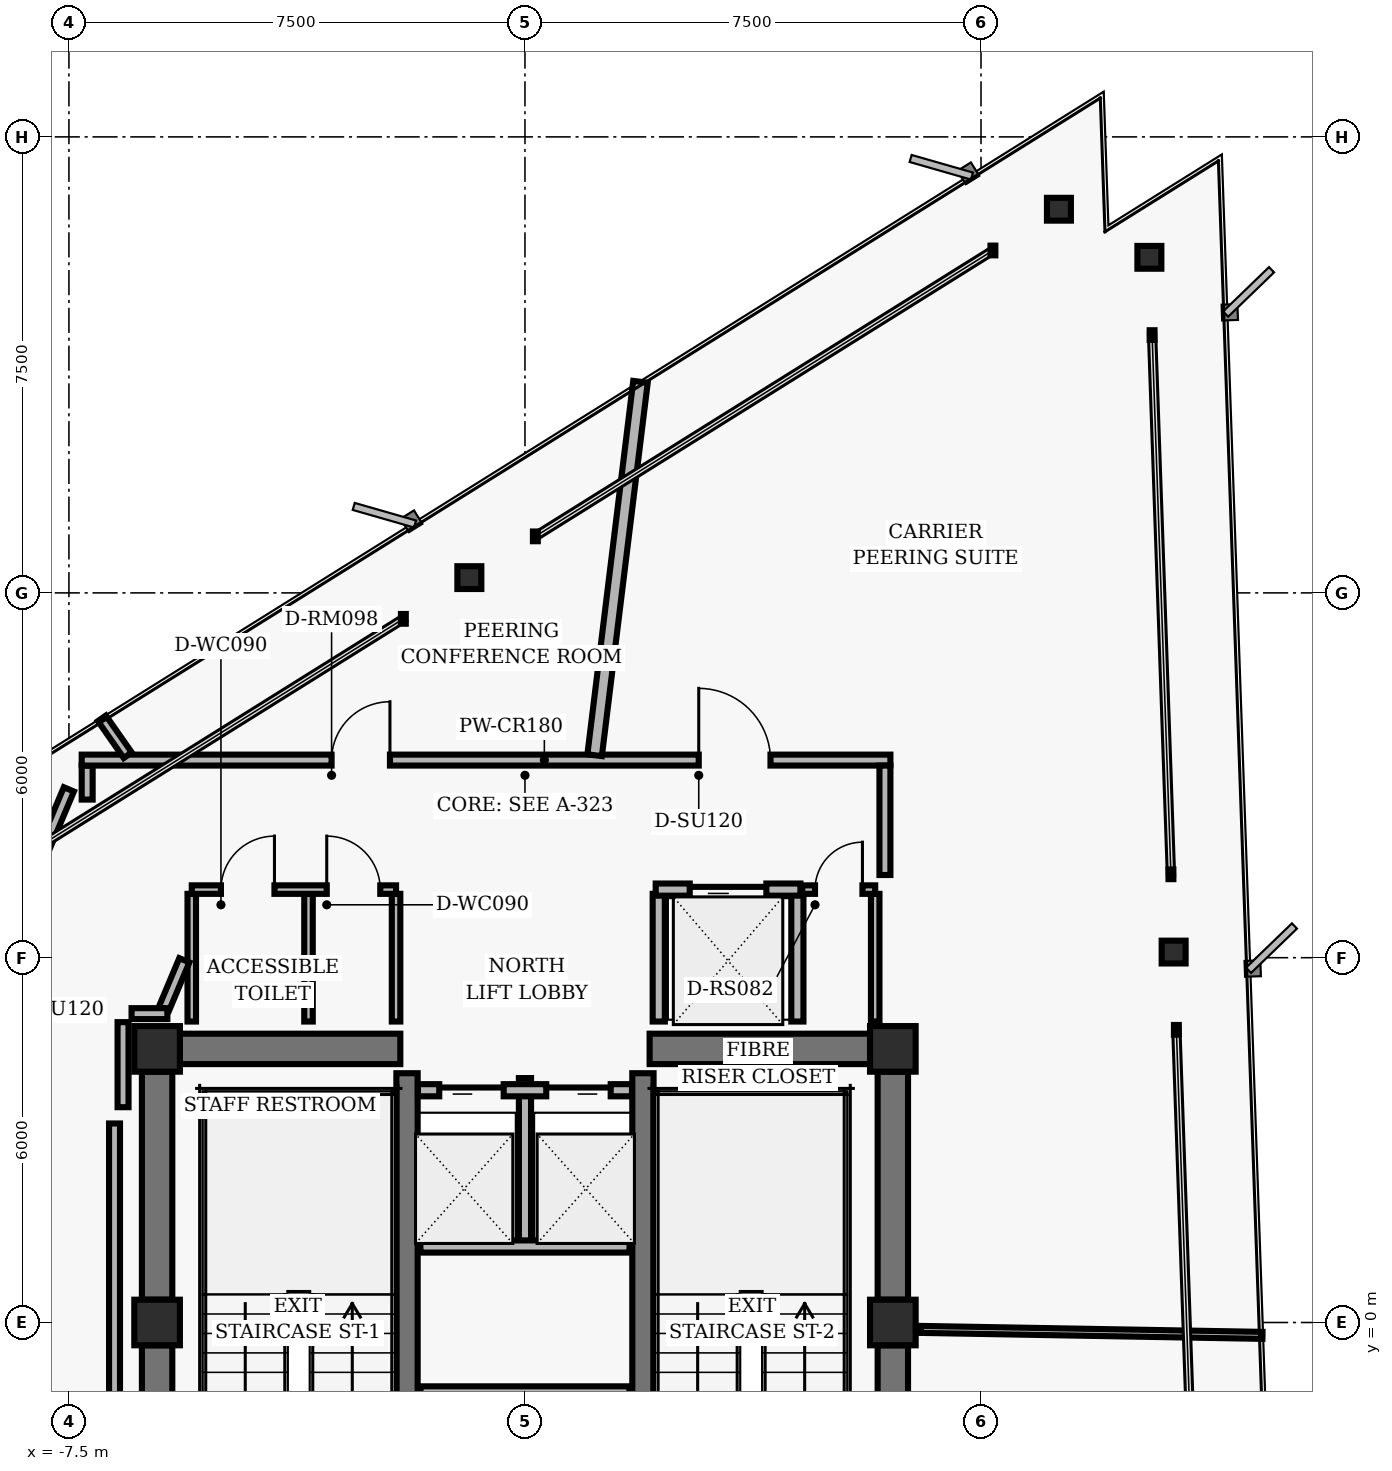
"""IFC4 building model, lengths in metres.
Left out: names, types, materials, properties, quantities, classifications, styles, units other than length and angle.
Written with IfcOpenShell. Run it as: python <this file> out.ifc"""

import sys

from ifc_helpers import new_model, si_unit, direction, frame, frame_2d, origin, origin_2d, place, context, subcontext, project, spatial, rectangle, hollow_rectangle, i_section, extrude, element, fill, save


model = new_model("IFC4")
c1 = context("Model", 3, precision=1e-05, world=origin(), true_north=direction((0.0, 1.0)))
c2 = subcontext(c1, "Body", "Model", "MODEL_VIEW")
j1 = project(units=[si_unit("LENGTHUNIT", "METRE"), si_unit("PLANEANGLEUNIT", "RADIAN")], contexts=[c1])
p1 = place(None, origin())
s1 = spatial("IfcSite", under=j1, at=p1, CompositionType="ELEMENT")
p2 = place(p1, origin())
s2 = spatial("IfcBuilding", under=s1, at=p2, CompositionType="ELEMENT")
p3 = place(p2, frame((0.0, 0.0, 208.8)))
s3 = spatial("IfcBuildingStorey", under=s2, at=p3, CompositionType="ELEMENT", Elevation=208.8)
for number, where, z_axis, x_axis in (
    (1, (-6.05, 4.5, 0.0), (0.0, 0.0, 1.0), (1.0, 0.0, 0.0)),
    (2, (6.05, 4.5, 0.0), (0.0, 0.0, 1.0), (1.0, 0.0, 0.0)),
    (3, (-6.05, 0.0, 0.0), (0.0, 0.0, 1.0), (1.0, 0.0, 0.0)),
    (4, (6.05, 0.0, 0.0), (0.0, 0.0, 1.0), (1.0, 0.0, 0.0)),
):
    element("IfcColumn", number, at=place(p3, frame(where, z_axis=z_axis, x_axis=x_axis)), inside=s3, PredefinedType="COLUMN", context=c2, shape_type="SweptSolid", body=[
        extrude(hollow_rectangle(XDim=0.75, YDim=0.75, WallThickness=0.05, InnerFilletRadius=0.02, OuterFilletRadius=0.04, at=origin_2d()), origin(), (0.0, 0.0, 1.0), 3.04),
    ])
p4 = place(p3, frame((-6.05, 0.375, 0.0), z_axis=(0.0, 0.0, 1.0), x_axis=(0.0, 1.0, 0.0)))
e5 = element("IfcWall", 5, at=p4, inside=s3, PredefinedType="SHEAR", context=c2, shape_type="SweptSolid", body=[
    extrude(rectangle(XDim=3.75, YDim=0.5, at=frame_2d((1.875, 0.0))), origin(), (0.0, 0.0, 1.0), 2.798),
])
p5 = place(p3, frame((-6.05, -3.925, 0.0), z_axis=(0.0, 0.0, 1.0), x_axis=(0.0, 1.0, 0.0)))
e6 = element("IfcWall", 6, at=p5, inside=s3, PredefinedType="SHEAR", context=c2, shape_type="SweptSolid", body=[
    extrude(rectangle(XDim=3.55, YDim=0.5, at=frame_2d((1.775, 0.0))), origin(), (0.0, 0.0, 1.0), 2.798),
])
p6 = place(p3, frame((6.05, 0.375, 0.0), z_axis=(0.0, 0.0, 1.0), x_axis=(0.0, 1.0, 0.0)))
e7 = element("IfcWall", 7, at=p6, inside=s3, PredefinedType="SHEAR", context=c2, shape_type="SweptSolid", body=[
    extrude(rectangle(XDim=3.75, YDim=0.5, at=frame_2d((1.875, 0.0))), origin(), (0.0, 0.0, 1.0), 2.798),
])
p7 = place(p3, frame((6.05, -3.925, 0.0), z_axis=(0.0, 0.0, 1.0), x_axis=(0.0, 1.0, 0.0)))
e8 = element("IfcWall", 8, at=p7, inside=s3, PredefinedType="SHEAR", context=c2, shape_type="SweptSolid", body=[
    extrude(rectangle(XDim=3.55, YDim=0.5, at=frame_2d((1.775, 0.0))), origin(), (0.0, 0.0, 1.0), 2.798),
])
for number, where, z_axis, x_axis in (
    (9, (-1.94, -4.1, 0.0), (0.0, 0.0, 1.0), (0.0, 1.0, 0.0)),
    (10, (1.94, -4.1, 0.0), (0.0, 0.0, 1.0), (0.0, 1.0, 0.0)),
):
    element("IfcWall", number, at=place(p3, frame(where, z_axis=z_axis, x_axis=x_axis)), inside=s3, PredefinedType="SHEAR", context=c2, shape_type="SweptSolid", body=[
        extrude(rectangle(XDim=8.2, YDim=0.35, at=frame_2d((4.1, 0.0))), origin(), (0.0, 0.0, 1.0), 2.798),
    ])
for number, where, z_axis, x_axis in (
    (11, (-5.675, 4.5, 0.0), (0.0, 0.0, 1.0), (1.0, 0.0, 0.0)),
    (12, (2.05, 4.5, 0.0), (0.0, 0.0, 1.0), (1.0, 0.0, 0.0)),
):
    element("IfcWall", number, at=place(p3, frame(where, z_axis=z_axis, x_axis=x_axis)), inside=s3, PredefinedType="SHEAR", context=c2, shape_type="SweptSolid", body=[
        extrude(rectangle(XDim=3.625, YDim=0.5, at=frame_2d((1.812, 0.0))), origin(), (0.0, 0.0, 1.0), 2.798),
    ])
for number, where, z_axis, x_axis in (
    (13, (10.668, 6.093, 0.0), (0.0, 0.0, 1.0), (1.0, 0.0, 0.0)),
    (14, (10.269, 17.519, 0.0), (0.0, 0.0, 1.0), (1.0, 0.0, 0.0)),
    (15, (8.781, 18.31, 0.0), (0.0, 0.0, 1.0), (1.0, 0.0, 0.0)),
    (16, (-0.915, 12.251, 0.0), (0.0, 0.0, 1.0), (1.0, 0.0, 0.0)),
):
    element("IfcColumn", number, at=place(p3, frame(where, z_axis=z_axis, x_axis=x_axis)), inside=s3, PredefinedType="COLUMN", context=c2, shape_type="SweptSolid", body=[
        extrude(i_section(OverallWidth=0.394, OverallDepth=0.375, WebThickness=0.017, FlangeThickness=0.028, FilletRadius=0.016, at=origin_2d()), origin(), (0.0, 0.0, 1.0), 3.04),
    ])
p8 = place(p3, frame((-1.72, -1.15, 0.0), z_axis=(0.0, 0.0, 1.0), x_axis=(1.0, 0.0, 0.0)))
e17 = element("IfcWall", 17, at=p8, inside=s3, PredefinedType="PARTITIONING", context=c2, shape_type="SweptSolid", body=[
    extrude(rectangle(XDim=3.44, YDim=0.2, at=frame_2d((1.72, 0.0))), origin(), (0.0, 0.0, 1.0), 2.773),
])
p9 = place(p3, frame((0.0, 1.25, 0.0), z_axis=(0.0, 0.0, 1.0), x_axis=(0.0, 1.0, 0.0)))
e18 = element("IfcWall", 18, at=p9, inside=s3, PredefinedType="PARTITIONING", context=c2, shape_type="SweptSolid", body=[
    extrude(rectangle(XDim=2.77, YDim=0.2, at=frame_2d((1.385, 0.0))), origin(), (0.0, 0.0, 1.0), 2.773),
])
p10 = place(p3, frame((-1.72, 1.25, 0.0), z_axis=(0.0, 0.0, 1.0), x_axis=(1.0, 0.0, 0.0)))
e19 = element("IfcWall", 19, at=p10, inside=s3, PredefinedType="PARTITIONING", context=c2, shape_type="SweptSolid", body=[
    extrude(rectangle(XDim=3.44, YDim=0.2, at=frame_2d((1.72, 0.0))), origin(), (0.0, 0.0, 1.0), 2.773),
])
p11 = place(p3, frame((-1.76, 3.82, 0.0), z_axis=(0.0, 0.0, 1.0), x_axis=(1.0, 0.0, 0.0)))
e20 = element("IfcWall", 20, at=p11, inside=s3, PredefinedType="PARTITIONING", context=c2, shape_type="SweptSolid", body=[
    extrude(rectangle(XDim=3.52, YDim=0.2, at=frame_2d((1.76, 0.0))), origin(), (0.0, 0.0, 1.0), 2.773),
])
p12 = place(p11, frame((0.35, 0.0, 0.0)))
e21 = element("IfcOpeningElement", 21, at=p12, cuts=e20, PredefinedType="OPENING", context=c2, shape_type="SweptSolid", body=[
    extrude(rectangle(XDim=1.06, YDim=2.04, at=frame_2d((0.53, 1.02))), frame((0.0, 0.11, 0.0), z_axis=(0.0, -1.0, 0.0), x_axis=(1.0, 0.0, 0.0)), (0.0, 0.0, 1.0), 0.22),
])
p13 = place(p11, frame((2.11, 0.0, 0.0)))
e22 = element("IfcOpeningElement", 22, at=p13, cuts=e20, PredefinedType="OPENING", context=c2, shape_type="SweptSolid", body=[
    extrude(rectangle(XDim=1.06, YDim=2.04, at=frame_2d((0.53, 1.02))), frame((0.0, 0.11, 0.0), z_axis=(0.0, -1.0, 0.0), x_axis=(1.0, 0.0, 0.0)), (0.0, 0.0, 1.0), 0.22),
])
for number, where, z_axis, x_axis in (
    (23, (2.2, 4.95, 0.0), (0.0, 0.0, 1.0), (0.0, 1.0, 0.0)),
    (24, (4.48, 4.95, 0.0), (0.0, 0.0, 1.0), (0.0, 1.0, 0.0)),
):
    element("IfcWall", number, at=place(p3, frame(where, z_axis=z_axis, x_axis=x_axis)), inside=s3, PredefinedType="PARTITIONING", context=c2, shape_type="SweptSolid", body=[
        extrude(rectangle(XDim=2.1, YDim=0.2, at=frame_2d((1.05, 0.0))), origin(), (0.0, 0.0, 1.0), 2.773),
    ])
p14 = place(p3, frame((2.15, 7.12, 0.0), z_axis=(0.0, 0.0, 1.0), x_axis=(1.0, 0.0, 0.0)))
e25 = element("IfcWall", 25, at=p14, inside=s3, PredefinedType="PARTITIONING", context=c2, shape_type="SweptSolid", body=[
    extrude(rectangle(XDim=2.38, YDim=0.2, at=frame_2d((1.19, 0.0))), origin(), (0.0, 0.0, 1.0), 2.773),
])
p15 = place(p14, frame((0.56, 0.0, 0.0)))
e26 = element("IfcOpeningElement", 26, at=p15, cuts=e25, PredefinedType="OPENING", context=c2, shape_type="SweptSolid", body=[
    extrude(rectangle(XDim=1.26, YDim=2.06, at=frame_2d((0.63, 1.03))), frame((0.0, 0.11, 0.0), z_axis=(0.0, -1.0, 0.0), x_axis=(1.0, 0.0, 0.0)), (0.0, 0.0, 1.0), 0.22),
])
for number, where, z_axis, x_axis in (
    (27, (-5.48, 4.95, 0.0), (0.0, 0.0, 1.0), (0.0, 1.0, 0.0)),
    (28, (-3.56, 4.95, 0.0), (0.0, 0.0, 1.0), (0.0, 1.0, 0.0)),
    (29, (-2.12, 4.95, 0.0), (0.0, 0.0, 1.0), (0.0, 1.0, 0.0)),
):
    element("IfcWall", number, at=place(p3, frame(where, z_axis=z_axis, x_axis=x_axis)), inside=s3, PredefinedType="PARTITIONING", context=c2, shape_type="SweptSolid", body=[
        extrude(rectangle(XDim=2.1, YDim=0.14, at=frame_2d((1.05, 0.0))), origin(), (0.0, 0.0, 1.0), 2.773),
    ])
p16 = place(p3, frame((-5.48, 7.12, 0.0), z_axis=(0.0, 0.0, 1.0), x_axis=(1.0, 0.0, 0.0)))
e30 = element("IfcWall", 30, at=p16, inside=s3, PredefinedType="PARTITIONING", context=c2, shape_type="SweptSolid", body=[
    extrude(rectangle(XDim=3.36, YDim=0.14, at=frame_2d((1.68, 0.0))), origin(), (0.0, 0.0, 1.0), 2.773),
])
p17 = place(p16, frame((0.48, 0.0, 0.0)))
e31 = element("IfcOpeningElement", 31, at=p17, cuts=e30, PredefinedType="OPENING", context=c2, shape_type="SweptSolid", body=[
    extrude(rectangle(XDim=0.88, YDim=2.02, at=frame_2d((0.44, 1.01))), frame((0.0, 0.08, 0.0), z_axis=(0.0, -1.0, 0.0), x_axis=(1.0, 0.0, 0.0)), (0.0, 0.0, 1.0), 0.16),
])
p18 = place(p16, frame((2.22, 0.0, 0.0)))
e32 = element("IfcOpeningElement", 32, at=p18, cuts=e30, PredefinedType="OPENING", context=c2, shape_type="SweptSolid", body=[
    extrude(rectangle(XDim=0.88, YDim=2.02, at=frame_2d((0.44, 1.01))), frame((0.0, 0.08, 0.0), z_axis=(0.0, -1.0, 0.0), x_axis=(1.0, 0.0, 0.0)), (0.0, 0.0, 1.0), 0.16),
])
p19 = place(p3, frame((5.76, 4.95, 0.0), z_axis=(0.0, 0.0, 1.0), x_axis=(0.0, 1.0, 0.0)))
e33 = element("IfcWall", 33, at=p19, inside=s3, PredefinedType="PARTITIONING", context=c2, shape_type="SweptSolid", body=[
    extrude(rectangle(XDim=2.1, YDim=0.14, at=frame_2d((1.05, 0.0))), origin(), (0.0, 0.0, 1.0), 2.253),
])
p20 = place(p3, frame((4.56, 7.12, 0.0), z_axis=(0.0, 0.0, 1.0), x_axis=(1.0, 0.0, 0.0)))
e34 = element("IfcWall", 34, at=p20, inside=s3, PredefinedType="PARTITIONING", context=c2, shape_type="SweptSolid", body=[
    extrude(rectangle(XDim=1.2, YDim=0.14, at=frame_2d((0.6, 0.0))), origin(), (0.0, 0.0, 1.0), 2.773),
])
p21 = place(p20, frame((0.21, 0.0, 0.0)))
e35 = element("IfcOpeningElement", 35, at=p21, cuts=e34, PredefinedType="OPENING", context=c2, shape_type="SweptSolid", body=[
    extrude(rectangle(XDim=0.78, YDim=2.01, at=frame_2d((0.39, 1.005))), frame((0.0, 0.08, 0.0), z_axis=(0.0, -1.0, 0.0), x_axis=(1.0, 0.0, 0.0)), (0.0, 0.0, 1.0), 0.16),
])
p22 = place(p3, frame((-9.367, 4.332, 0.0), z_axis=(0.0, 0.0, 1.0), x_axis=(0.387573945081, 0.921838617706, 0.0)))
e36 = element("IfcWall", 36, at=p22, inside=s3, PredefinedType="PARTITIONING", context=c2, shape_type="SweptSolid", body=[
    extrude(rectangle(XDim=4.813, YDim=0.18, at=frame_2d((2.407, 0.0))), origin(), (0.0, 0.0, 1.0), 2.773),
])
p23 = place(p22, frame((1.817, 0.0, 0.0)))
e37 = element("IfcOpeningElement", 37, at=p23, cuts=e36, PredefinedType="OPENING", context=c2, shape_type="SweptSolid", body=[
    extrude(rectangle(XDim=1.18, YDim=2.02, at=frame_2d((0.59, 1.01))), frame((0.0, 0.1, 0.0), z_axis=(0.0, -1.0, 0.0), x_axis=(1.0, 0.0, 0.0)), (0.0, 0.0, 1.0), 0.2),
])
p24 = place(p3, frame((-7.2, 8.601, 0.0), z_axis=(0.0, 0.0, 1.0), x_axis=(0.0, 1.0, 0.0)))
e38 = element("IfcWall", 38, at=p24, inside=s3, PredefinedType="PARTITIONING", context=c2, shape_type="SweptSolid", body=[
    extrude(rectangle(XDim=0.559, YDim=0.18, at=frame_2d((0.28, 0.0))), origin(), (0.0, 0.0, 1.0), 2.773),
])
p25 = place(p3, frame((-7.29, 9.25, 0.0), z_axis=(0.0, 0.0, 1.0), x_axis=(1.0, 0.0, 0.0)))
e39 = element("IfcWall", 39, at=p25, inside=s3, PredefinedType="PARTITIONING", context=c2, shape_type="SweptSolid", body=[
    extrude(rectangle(XDim=13.3, YDim=0.18, at=frame_2d((6.65, 0.0))), origin(), (0.0, 0.0, 1.0), 2.773),
])
p26 = place(p25, frame((10.148, 0.0, 0.0)))
e40 = element("IfcOpeningElement", 40, at=p26, cuts=e39, PredefinedType="OPENING", context=c2, shape_type="SweptSolid", body=[
    extrude(rectangle(XDim=1.18, YDim=2.02, at=frame_2d((0.59, 1.01))), frame((0.0, 0.1, 0.0), z_axis=(0.0, -1.0, 0.0), x_axis=(1.0, 0.0, 0.0)), (0.0, 0.0, 1.0), 0.2),
])
p27 = place(p25, frame((4.11, 0.0, 0.0)))
e41 = element("IfcOpeningElement", 41, at=p27, cuts=e39, PredefinedType="OPENING", context=c2, shape_type="SweptSolid", body=[
    extrude(rectangle(XDim=0.96, YDim=2.02, at=frame_2d((0.48, 1.01))), frame((0.0, 0.1, 0.0), z_axis=(0.0, -1.0, 0.0), x_axis=(1.0, 0.0, 0.0)), (0.0, 0.0, 1.0), 0.2),
])
p28 = place(p3, frame((5.92, 9.16, 0.0), z_axis=(0.0, 0.0, 1.0), x_axis=(0.0, -1.0, 0.0)))
e42 = element("IfcWall", 42, at=p28, inside=s3, PredefinedType="PARTITIONING", context=c2, shape_type="SweptSolid", body=[
    extrude(rectangle(XDim=1.8, YDim=0.18, at=frame_2d((0.9, 0.0))), origin(), (0.0, 0.0, 1.0), 2.773),
])
p29 = place(p3, frame((-5.602, 5.958, 0.0), z_axis=(0.0, 0.0, 1.0), x_axis=(-0.387588639363, -0.921832439566, 0.0)))
e43 = element("IfcWall", 43, at=p29, inside=s3, PredefinedType="PARTITIONING", context=c2, shape_type="SweptSolid", body=[
    extrude(rectangle(XDim=0.862, YDim=0.18, at=frame_2d((0.431, 0.0))), origin(), (0.0, 0.0, 1.0), 2.773),
])
p30 = place(p3, frame((-5.881, 5.08, 0.0), z_axis=(0.0, 0.0, 1.0), x_axis=(-1.0, 0.0, 0.0)))
e44 = element("IfcWall", 44, at=p30, inside=s3, PredefinedType="PARTITIONING", context=c2, shape_type="SweptSolid", body=[
    extrude(rectangle(XDim=0.589, YDim=0.18, at=frame_2d((0.294, 0.0))), origin(), (0.0, 0.0, 1.0), 2.773),
])
p31 = place(p3, frame((-6.61, 4.94, 0.0), z_axis=(0.0, 0.0, 1.0), x_axis=(0.0, -1.0, 0.0)))
e45 = element("IfcWall", 45, at=p31, inside=s3, PredefinedType="PARTITIONING", context=c2, shape_type="SweptSolid", body=[
    extrude(rectangle(XDim=1.399, YDim=0.18, at=frame_2d((0.699, 0.0))), origin(), (0.0, 0.0, 1.0), 2.773),
])
p32 = place(p3, frame((-6.75, 3.273, 0.0), z_axis=(0.0, 0.0, 1.0), x_axis=(0.0, -1.0, 0.0)))
e46 = element("IfcWall", 46, at=p32, inside=s3, PredefinedType="PARTITIONING", context=c2, shape_type="SweptSolid", body=[
    extrude(rectangle(XDim=6.547, YDim=0.18, at=frame_2d((3.273, 0.0))), origin(), (0.0, 0.0, 1.0), 2.773),
])
p33 = place(p3, frame((6.51, -0.114, 0.0), z_axis=(0.0, 0.0, 1.0), x_axis=(0.999847502382, -0.017463446992, 0.0)))
e47 = element("IfcWall", 47, at=p33, inside=s3, PredefinedType="MOVABLE", context=c2, shape_type="SweptSolid", body=[
    extrude(rectangle(XDim=5.62, YDim=0.115, at=frame_2d((2.81, 0.0))), origin(), (0.0, 0.0, 1.0), 2.773),
])
p34 = place(p3, frame((1.146, 9.33, 0.0), z_axis=(0.0, 0.0, 1.0), x_axis=(0.121873572304, 0.992545632389, 0.0)))
e48 = element("IfcWall", 48, at=p34, inside=s3, PredefinedType="PARTITIONING", context=c2, shape_type="SweptSolid", body=[
    extrude(rectangle(XDim=6.188, YDim=0.24, at=frame_2d((3.094, 0.0))), origin(), (0.0, 0.0, 1.0), 2.773),
])
p35 = place(p3, frame((-6.533, 9.33, 0.0), z_axis=(0.0, 0.0, 1.0), x_axis=(-0.573639237496, 0.819108066866, 0.0)))
e49 = element("IfcWall", 49, at=p35, inside=s3, PredefinedType="PARTITIONING", context=c2, shape_type="SweptSolid", body=[
    extrude(rectangle(XDim=0.741, YDim=0.16, at=frame_2d((0.371, 0.0))), origin(), (0.0, 0.0, 1.0), 2.773),
])
p36 = place(p12, origin())
e50 = element("IfcDoor", 50, at=p36, inside=s3, OperationType="SLIDING_TO_LEFT", PredefinedType="DOOR", context=c2, shape_type="SweptSolid", body=[
    extrude(rectangle(XDim=1.06, YDim=2.04, at=frame_2d((0.53, 1.02))), frame((0.0, 0.025, 0.0), z_axis=(0.0, -1.0, 0.0), x_axis=(1.0, 0.0, 0.0)), (0.0, 0.0, 1.0), 0.05),
])
fill(e21, e50)
p37 = place(p13, origin())
e51 = element("IfcDoor", 51, at=p37, inside=s3, OperationType="SLIDING_TO_RIGHT", PredefinedType="DOOR", context=c2, shape_type="SweptSolid", body=[
    extrude(rectangle(XDim=1.06, YDim=2.04, at=frame_2d((0.53, 1.02))), frame((0.0, 0.025, 0.0), z_axis=(0.0, -1.0, 0.0), x_axis=(1.0, 0.0, 0.0)), (0.0, 0.0, 1.0), 0.05),
])
fill(e22, e51)
p38 = place(p15, origin())
e52 = element("IfcDoor", 52, at=p38, inside=s3, OperationType="SLIDING_TO_LEFT", PredefinedType="DOOR", context=c2, shape_type="SweptSolid", body=[
    extrude(rectangle(XDim=1.26, YDim=2.06, at=frame_2d((0.63, 1.03))), frame((0.0, 0.025, 0.0), z_axis=(0.0, -1.0, 0.0), x_axis=(1.0, 0.0, 0.0)), (0.0, 0.0, 1.0), 0.05),
])
fill(e26, e52)
p39 = place(p17, origin())
e53 = element("IfcDoor", 53, at=p39, inside=s3, OperationType="SINGLE_SWING_RIGHT", PredefinedType="DOOR", context=c2, shape_type="SweptSolid", body=[
    extrude(rectangle(XDim=0.88, YDim=2.02, at=frame_2d((0.44, 1.01))), frame((0.0, 0.025, 0.0), z_axis=(0.0, -1.0, 0.0), x_axis=(1.0, 0.0, 0.0)), (0.0, 0.0, 1.0), 0.05),
])
fill(e31, e53)
p40 = place(p18, origin())
e54 = element("IfcDoor", 54, at=p40, inside=s3, OperationType="SINGLE_SWING_LEFT", PredefinedType="DOOR", context=c2, shape_type="SweptSolid", body=[
    extrude(rectangle(XDim=0.88, YDim=2.02, at=frame_2d((0.44, 1.01))), frame((0.0, 0.025, 0.0), z_axis=(0.0, -1.0, 0.0), x_axis=(1.0, 0.0, 0.0)), (0.0, 0.0, 1.0), 0.05),
])
fill(e32, e54)
p41 = place(p21, origin())
e55 = element("IfcDoor", 55, at=p41, inside=s3, OperationType="SINGLE_SWING_RIGHT", PredefinedType="DOOR", context=c2, shape_type="SweptSolid", body=[
    extrude(rectangle(XDim=0.78, YDim=2.01, at=frame_2d((0.39, 1.005))), frame((0.0, 0.025, 0.0), z_axis=(0.0, -1.0, 0.0), x_axis=(1.0, 0.0, 0.0)), (0.0, 0.0, 1.0), 0.05),
])
fill(e35, e55)
p42 = place(p26, origin())
e56 = element("IfcDoor", 56, at=p42, inside=s3, OperationType="SINGLE_SWING_LEFT", PredefinedType="DOOR", context=c2, shape_type="SweptSolid", body=[
    extrude(rectangle(XDim=1.18, YDim=2.02, at=frame_2d((0.59, 1.01))), frame((0.0, 0.025, 0.0), z_axis=(0.0, -1.0, 0.0), x_axis=(1.0, 0.0, 0.0)), (0.0, 0.0, 1.0), 0.05),
])
fill(e40, e56)
p43 = place(p27, origin())
e57 = element("IfcDoor", 57, at=p43, inside=s3, OperationType="SINGLE_SWING_RIGHT", PredefinedType="DOOR", context=c2, shape_type="SweptSolid", body=[
    extrude(rectangle(XDim=0.96, YDim=2.02, at=frame_2d((0.48, 1.01))), frame((0.0, 0.025, 0.0), z_axis=(0.0, -1.0, 0.0), x_axis=(1.0, 0.0, 0.0)), (0.0, 0.0, 1.0), 0.05),
])
fill(e41, e57)
save(model, sys.argv[1])
